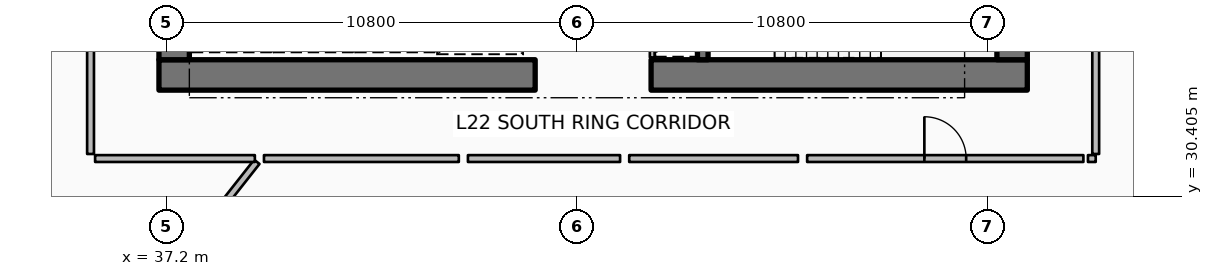
"""IFC4 building model, lengths in metres.
Left out: names, types, materials, properties, quantities, classifications, styles, units other than length and angle.
Written with IfcOpenShell. Run it as: python <this file> out.ifc"""

import sys

from ifc_helpers import new_model, si_unit, direction, frame, frame_2d, origin, place, context, subcontext, project, spatial, rectangle, extrude, element, fill, save


model = new_model("IFC4")
c1 = context("Model", 3, precision=1e-05, world=origin(), true_north=direction((0.0, 1.0)))
c2 = subcontext(c1, "Body", "Model", "MODEL_VIEW")
j1 = project(units=[si_unit("LENGTHUNIT", "METRE"), si_unit("PLANEANGLEUNIT", "RADIAN")], contexts=[c1])
p1 = place(None, origin())
s1 = spatial("IfcSite", under=j1, at=p1, CompositionType="ELEMENT")
p2 = place(p1, origin())
s2 = spatial("IfcBuilding", under=s1, at=p2, CompositionType="ELEMENT")
p3 = place(p2, frame((0.0, 0.0, 90.15)))
s3 = spatial("IfcBuildingStorey", under=s2, at=p3, CompositionType="ELEMENT", Elevation=90.15)
p4 = place(p3, frame((37.0, 33.6, 0.0), z_axis=(0.0, 0.0, 1.0), x_axis=(1.0, 0.0, 0.0)))
e1 = element("IfcWall", 1, at=p4, inside=s3, PredefinedType="SHEAR", context=c2, shape_type="SweptSolid", body=[
    extrude(rectangle(XDim=9.9, YDim=0.8, at=frame_2d((4.95, 0.0))), origin(), (0.0, 0.0, 1.0), 3.75),
])
p5 = place(p3, frame((49.95, 33.6, 0.0), z_axis=(0.0, 0.0, 1.0), x_axis=(1.0, 0.0, 0.0)))
e2 = element("IfcWall", 2, at=p5, inside=s3, PredefinedType="SHEAR", context=c2, shape_type="SweptSolid", body=[
    extrude(rectangle(XDim=9.9, YDim=0.8, at=frame_2d((4.95, 0.0))), origin(), (0.0, 0.0, 1.0), 3.75),
])
for number, where, z_axis, x_axis in (
    (3, (37.4, 34.0, 0.0), (0.0, 0.0, 1.0), (0.0, 1.0, 0.0)),
    (4, (59.45, 34.0, 0.0), (0.0, 0.0, 1.0), (0.0, 1.0, 0.0)),
):
    element("IfcWall", number, at=place(p3, frame(where, z_axis=z_axis, x_axis=x_axis)), inside=s3, PredefinedType="SHEAR", context=c2, shape_type="SweptSolid", body=[
        extrude(rectangle(XDim=16.0, YDim=0.8, at=frame_2d((8.0, 0.0))), origin(), (0.0, 0.0, 1.0), 3.75),
    ])
p6 = place(p3, frame((51.31, 34.0, 0.0), z_axis=(0.0, 0.0, 1.0), x_axis=(0.0, 1.0, 0.0)))
e5 = element("IfcWall", 5, at=p6, inside=s3, PredefinedType="SHEAR", context=c2, shape_type="SweptSolid", body=[
    extrude(rectangle(XDim=3.5, YDim=0.28, at=frame_2d((1.75, 0.0))), origin(), (0.0, 0.0, 1.0), 3.75),
])
p7 = place(p3, frame((49.98, 34.06, 0.0), z_axis=(0.0, 0.0, 1.0), x_axis=(0.0, 1.0, 0.0)))
e6 = element("IfcWall", 6, at=p7, inside=s3, PredefinedType="PARTITIONING", context=c2, shape_type="SweptSolid", body=[
    extrude(rectangle(XDim=3.4, YDim=0.125, at=frame_2d((1.7, 0.0))), origin(), (0.0, 0.0, 1.0), 2.94),
])
p8 = place(p3, frame((39.575, 31.314, 0.0), z_axis=(0.0, 0.0, 1.0), x_axis=(-0.619083417853, -0.785325233098, 0.0)))
e7 = element("IfcWall", 7, at=p8, inside=s3, PredefinedType="PARTITIONING", context=c2, shape_type="SweptSolid", body=[
    extrude(rectangle(XDim=15.063, YDim=0.18, at=frame_2d((7.532, 0.0))), origin(), (0.0, 0.0, 1.0), 2.94),
])
p9 = place(p3, frame((61.756, 38.12, 0.0), z_axis=(0.0, 0.0, 1.0), x_axis=(0.962455861176, -0.271438234756, 0.0)))
e8 = element("IfcWall", 8, at=p9, inside=s3, PredefinedType="PARTITIONING", context=c2, shape_type="SweptSolid", body=[
    extrude(rectangle(XDim=14.279, YDim=0.18, at=frame_2d((7.139, 0.0))), origin(), (0.0, 0.0, 1.0), 2.94),
])
p10 = place(p3, frame((35.2, 34.712, 0.0), z_axis=(0.0, 0.0, 1.0), x_axis=(0.0, -1.0, 0.0)))
e9 = element("IfcWall", 9, at=p10, inside=s3, PredefinedType="PARTITIONING", context=c2, shape_type="SweptSolid", body=[
    extrude(rectangle(XDim=3.192, YDim=0.18, at=frame_2d((1.596, 0.0))), origin(), (0.0, 0.0, 1.0), 2.94),
])
p11 = place(p3, frame((35.32, 31.4, 0.0), z_axis=(0.0, 0.0, 1.0), x_axis=(1.0, 0.0, 0.0)))
e10 = element("IfcWall", 10, at=p11, inside=s3, PredefinedType="PARTITIONING", context=c2, shape_type="SweptSolid", body=[
    extrude(rectangle(XDim=4.204, YDim=0.18, at=frame_2d((2.102, 0.0))), origin(), (0.0, 0.0, 1.0), 2.94),
])
p12 = place(p3, frame((54.056, 31.4, 0.0), z_axis=(0.0, 0.0, 1.0), x_axis=(1.0, 0.0, 0.0)))
e11 = element("IfcWall", 11, at=p12, inside=s3, PredefinedType="PARTITIONING", context=c2, shape_type="SweptSolid", body=[
    extrude(rectangle(XDim=7.27, YDim=0.18, at=frame_2d((3.635, 0.0))), origin(), (0.0, 0.0, 1.0), 2.94),
])
p13 = place(p12, frame((3.085, 0.0, 0.0)))
e12 = element("IfcOpeningElement", 12, at=p13, cuts=e11, PredefinedType="OPENING", context=c2, shape_type="SweptSolid", body=[
    extrude(rectangle(XDim=1.1, YDim=2.1, at=frame_2d((0.55, 1.05))), frame((0.0, 0.1, 0.0), z_axis=(0.0, -1.0, 0.0), x_axis=(1.0, 0.0, 0.0)), (0.0, 0.0, 1.0), 0.2),
])
p14 = place(p3, frame((39.764, 31.4, 0.0), z_axis=(0.0, 0.0, 1.0), x_axis=(1.0, 0.0, 0.0)))
e13 = element("IfcWall", 13, at=p14, inside=s3, PredefinedType="PARTITIONING", context=c2, shape_type="SweptSolid", body=[
    extrude(rectangle(XDim=5.127, YDim=0.18, at=frame_2d((2.563, 0.0))), origin(), (0.0, 0.0, 1.0), 2.94),
])
p15 = place(p3, frame((45.131, 31.4, 0.0), z_axis=(0.0, 0.0, 1.0), x_axis=(1.0, 0.0, 0.0)))
e14 = element("IfcWall", 14, at=p15, inside=s3, PredefinedType="PARTITIONING", context=c2, shape_type="SweptSolid", body=[
    extrude(rectangle(XDim=4.004, YDim=0.18, at=frame_2d((2.002, 0.0))), origin(), (0.0, 0.0, 1.0), 2.94),
])
p16 = place(p3, frame((49.375, 31.4, 0.0), z_axis=(0.0, 0.0, 1.0), x_axis=(1.0, 0.0, 0.0)))
e15 = element("IfcWall", 15, at=p16, inside=s3, PredefinedType="PARTITIONING", context=c2, shape_type="SweptSolid", body=[
    extrude(rectangle(XDim=4.442, YDim=0.18, at=frame_2d((2.221, 0.0))), origin(), (0.0, 0.0, 1.0), 2.94),
])
p17 = place(p3, frame((61.446, 31.4, 0.0), z_axis=(0.0, 0.0, 1.0), x_axis=(1.0, 0.0, 0.0)))
e16 = element("IfcWall", 16, at=p17, inside=s3, PredefinedType="PARTITIONING", context=c2, shape_type="SweptSolid", body=[
    extrude(rectangle(XDim=0.204, YDim=0.18, at=frame_2d((0.102, 0.0))), origin(), (0.0, 0.0, 1.0), 2.94),
])
p18 = place(p3, frame((61.65, 31.52, 0.0), z_axis=(0.0, 0.0, 1.0), x_axis=(0.0, 1.0, 0.0)))
e17 = element("IfcWall", 17, at=p18, inside=s3, PredefinedType="PARTITIONING", context=c2, shape_type="SweptSolid", body=[
    extrude(rectangle(XDim=6.51, YDim=0.18, at=frame_2d((3.255, 0.0))), origin(), (0.0, 0.0, 1.0), 2.94),
])
p19 = place(p13, origin())
e18 = element("IfcDoor", 18, at=p19, inside=s3, OperationType="SINGLE_SWING_LEFT", PredefinedType="DOOR", context=c2, shape_type="SweptSolid", body=[
    extrude(rectangle(XDim=1.1, YDim=2.1, at=frame_2d((0.55, 1.05))), frame((0.0, 0.025, 0.0), z_axis=(0.0, -1.0, 0.0), x_axis=(1.0, 0.0, 0.0)), (0.0, 0.0, 1.0), 0.05),
])
fill(e12, e18)
save(model, sys.argv[1])
